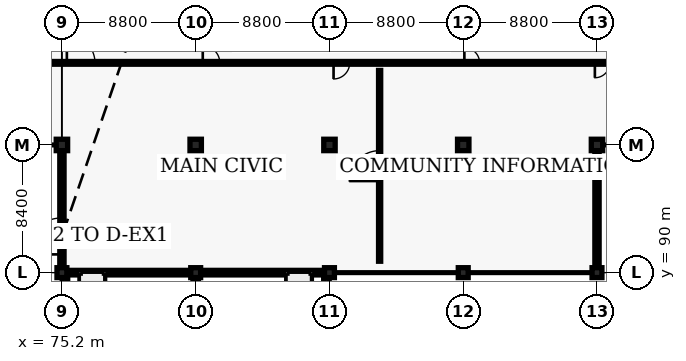
"""IFC4 building model, lengths in metres.
Left out: names, types, materials, properties, quantities, classifications, styles, units other than length and angle.
Written with IfcOpenShell. Run it as: python <this file> out.ifc"""

import sys

from ifc_helpers import new_model, si_unit, direction, frame, frame_2d, origin, origin_2d, place, context, subcontext, project, spatial, rectangle, extrude, element, fill, save


model = new_model("IFC4")
c1 = context("Model", 3, precision=1e-05, world=origin(), true_north=direction((0.0, 1.0)))
c2 = subcontext(c1, "Body", "Model", "MODEL_VIEW")
j1 = project(units=[si_unit("LENGTHUNIT", "METRE"), si_unit("PLANEANGLEUNIT", "RADIAN")], contexts=[c1])
p1 = place(None, origin())
s1 = spatial("IfcSite", under=j1, at=p1, CompositionType="ELEMENT")
p2 = place(p1, origin())
s2 = spatial("IfcBuilding", under=s1, at=p2, CompositionType="ELEMENT")
p3 = place(p2, origin())
s3 = spatial("IfcBuildingStorey", under=s2, at=p3, CompositionType="ELEMENT", Elevation=0.0)
p4 = place(p3, frame((75.2, 90.0, 0.0), z_axis=(0.0, 0.0, 1.0), x_axis=(1.0, 0.0, 0.0)))
e1 = element("IfcColumn", 1, at=p4, inside=s3, PredefinedType="COLUMN", context=c2, shape_type="SweptSolid", body=[
    extrude(rectangle(XDim=0.65, YDim=0.65, at=origin_2d()), origin(), (0.0, 0.0, 1.0), 4.8),
])
p5 = place(p3, frame((75.2, 98.4, 0.0), z_axis=(0.0, 0.0, 1.0), x_axis=(1.0, 0.0, 0.0)))
e2 = element("IfcColumn", 2, at=p5, inside=s3, PredefinedType="COLUMN", context=c2, shape_type="SweptSolid", body=[
    extrude(rectangle(XDim=0.75, YDim=0.75, at=origin_2d()), origin(), (0.0, 0.0, 1.0), 4.8),
])
p6 = place(p3, frame((84.0, 90.0, 0.0), z_axis=(0.0, 0.0, 1.0), x_axis=(1.0, 0.0, 0.0)))
e3 = element("IfcColumn", 3, at=p6, inside=s3, PredefinedType="COLUMN", context=c2, shape_type="SweptSolid", body=[
    extrude(rectangle(XDim=0.65, YDim=0.65, at=origin_2d()), origin(), (0.0, 0.0, 1.0), 4.8),
])
p7 = place(p3, frame((84.0, 98.4, 0.0), z_axis=(0.0, 0.0, 1.0), x_axis=(1.0, 0.0, 0.0)))
e4 = element("IfcColumn", 4, at=p7, inside=s3, PredefinedType="COLUMN", context=c2, shape_type="SweptSolid", body=[
    extrude(rectangle(XDim=0.75, YDim=0.75, at=origin_2d()), origin(), (0.0, 0.0, 1.0), 4.8),
])
p8 = place(p3, frame((92.8, 90.0, 0.0), z_axis=(0.0, 0.0, 1.0), x_axis=(1.0, 0.0, 0.0)))
e5 = element("IfcColumn", 5, at=p8, inside=s3, PredefinedType="COLUMN", context=c2, shape_type="SweptSolid", body=[
    extrude(rectangle(XDim=0.65, YDim=0.65, at=origin_2d()), origin(), (0.0, 0.0, 1.0), 4.8),
])
p9 = place(p3, frame((92.8, 98.4, 0.0), z_axis=(0.0, 0.0, 1.0), x_axis=(1.0, 0.0, 0.0)))
e6 = element("IfcColumn", 6, at=p9, inside=s3, PredefinedType="COLUMN", context=c2, shape_type="SweptSolid", body=[
    extrude(rectangle(XDim=0.75, YDim=0.75, at=origin_2d()), origin(), (0.0, 0.0, 1.0), 4.8),
])
p10 = place(p3, frame((101.6, 90.0, 0.0), z_axis=(0.0, 0.0, 1.0), x_axis=(1.0, 0.0, 0.0)))
e7 = element("IfcColumn", 7, at=p10, inside=s3, PredefinedType="COLUMN", context=c2, shape_type="SweptSolid", body=[
    extrude(rectangle(XDim=0.65, YDim=0.65, at=origin_2d()), origin(), (0.0, 0.0, 1.0), 4.8),
])
p11 = place(p3, frame((101.6, 98.4, 0.0), z_axis=(0.0, 0.0, 1.0), x_axis=(1.0, 0.0, 0.0)))
e8 = element("IfcColumn", 8, at=p11, inside=s3, PredefinedType="COLUMN", context=c2, shape_type="SweptSolid", body=[
    extrude(rectangle(XDim=0.75, YDim=0.75, at=origin_2d()), origin(), (0.0, 0.0, 1.0), 4.8),
])
p12 = place(p3, frame((110.4, 90.0, 0.0), z_axis=(0.0, 0.0, 1.0), x_axis=(1.0, 0.0, 0.0)))
e9 = element("IfcColumn", 9, at=p12, inside=s3, PredefinedType="COLUMN", context=c2, shape_type="SweptSolid", body=[
    extrude(rectangle(XDim=0.65, YDim=0.65, at=origin_2d()), origin(), (0.0, 0.0, 1.0), 4.8),
])
p13 = place(p3, frame((110.4, 98.4, 0.0), z_axis=(0.0, 0.0, 1.0), x_axis=(1.0, 0.0, 0.0)))
e10 = element("IfcColumn", 10, at=p13, inside=s3, PredefinedType="COLUMN", context=c2, shape_type="SweptSolid", body=[
    extrude(rectangle(XDim=0.75, YDim=0.75, at=origin_2d()), origin(), (0.0, 0.0, 1.0), 4.8),
])
for number, where, z_axis, x_axis in (
    (11, (75.3, 90.0, 0.0), (0.0, 0.0, 1.0), (1.0, 0.0, 0.0)),
    (12, (84.1, 90.0, 0.0), (0.0, 0.0, 1.0), (1.0, 0.0, 0.0)),
):
    element("IfcWall", number, at=place(p3, frame(where, z_axis=z_axis, x_axis=x_axis)), inside=s3, PredefinedType="SOLIDWALL", context=c2, shape_type="SweptSolid", body=[
        extrude(rectangle(XDim=8.6, YDim=0.3, at=frame_2d((4.3, 0.0))), origin(), (0.0, 0.0, 1.0), 3.675),
    ])
p14 = place(p3, frame((75.2, 90.15, 0.0), z_axis=(0.0, 0.0, 1.0), x_axis=(0.0, 1.0, 0.0)))
e13 = element("IfcWall", 13, at=p14, inside=s3, PredefinedType="SOLIDWALL", context=c2, shape_type="SweptSolid", body=[
    extrude(rectangle(XDim=8.1, YDim=0.28, at=frame_2d((4.05, 0.0))), origin(), (0.0, 0.0, 1.0), 3.775),
])
p15 = place(p14, frame((1.05, 0.0, 0.0)))
e14 = element("IfcOpeningElement", 14, at=p15, cuts=e13, PredefinedType="OPENING", context=c2, shape_type="SweptSolid", body=[
    extrude(rectangle(XDim=2.4, YDim=2.4, at=frame_2d((1.2, 1.2))), frame((0.0, 0.15, 0.0), z_axis=(0.0, -1.0, 0.0), x_axis=(1.0, 0.0, 0.0)), (0.0, 0.0, 1.0), 0.3),
])
p16 = place(p3, frame((110.4, 90.15, 0.0), z_axis=(0.0, 0.0, 1.0), x_axis=(0.0, 1.0, 0.0)))
e15 = element("IfcWall", 15, at=p16, inside=s3, PredefinedType="SOLIDWALL", context=c2, shape_type="SweptSolid", body=[
    extrude(rectangle(XDim=8.1, YDim=0.28, at=frame_2d((4.05, 0.0))), origin(), (0.0, 0.0, 1.0), 3.775),
])
for number, where, z_axis, x_axis in (
    (16, (75.4, 88.85, 0.0), (0.0, 0.0, 1.0), (0.0, 1.0, 0.0)),
    (17, (84.0, 88.85, 0.0), (0.0, 0.0, 1.0), (0.0, 1.0, 0.0)),
    (18, (92.6, 88.85, 0.0), (0.0, 0.0, 1.0), (0.0, 1.0, 0.0)),
):
    element("IfcWall", number, at=place(p3, frame(where, z_axis=z_axis, x_axis=x_axis)), inside=s3, PredefinedType="SOLIDWALL", context=c2, shape_type="SweptSolid", body=[
        extrude(rectangle(XDim=1.07, YDim=0.36, at=frame_2d((0.535, 0.0))), origin(), (0.0, 0.0, 1.0), 4.3),
    ])
p17 = place(p3, frame((42.15, 103.8, 0.0), z_axis=(0.0, 0.0, 1.0), x_axis=(1.0, 0.0, 0.0)))
e19 = element("IfcWall", 19, at=p17, inside=s3, PredefinedType="PARTITIONING", context=c2, shape_type="SweptSolid", body=[
    extrude(rectangle(XDim=102.9, YDim=0.18, at=frame_2d((51.45, 0.0))), origin(), (0.0, 0.0, 1.0), 3.775),
])
p18 = place(p17, frame((7.735, 0.0, 0.0)))
e20 = element("IfcOpeningElement", 20, at=p18, cuts=e19, PredefinedType="OPENING", context=c2, shape_type="SweptSolid", body=[
    extrude(rectangle(XDim=1.68, YDim=2.26, at=frame_2d((0.84, 1.13))), frame((0.0, 0.1, 0.0), z_axis=(0.0, -1.0, 0.0), x_axis=(1.0, 0.0, 0.0)), (0.0, 0.0, 1.0), 0.2),
])
p19 = place(p17, frame((16.63, 0.0, 0.0)))
e21 = element("IfcOpeningElement", 21, at=p19, cuts=e19, PredefinedType="OPENING", context=c2, shape_type="SweptSolid", body=[
    extrude(rectangle(XDim=1.04, YDim=2.08, at=frame_2d((0.52, 1.04))), frame((0.0, 0.1, 0.0), z_axis=(0.0, -1.0, 0.0), x_axis=(1.0, 0.0, 0.0)), (0.0, 0.0, 1.0), 0.2),
])
p20 = place(p17, frame((24.725, 0.0, 0.0)))
e22 = element("IfcOpeningElement", 22, at=p20, cuts=e19, PredefinedType="OPENING", context=c2, shape_type="SweptSolid", body=[
    extrude(rectangle(XDim=2.0, YDim=2.3, at=frame_2d((1.0, 1.15))), frame((0.0, 0.1, 0.0), z_axis=(0.0, -1.0, 0.0), x_axis=(1.0, 0.0, 0.0)), (0.0, 0.0, 1.0), 0.2),
])
p21 = place(p17, frame((33.375, 0.0, 0.0)))
e23 = element("IfcOpeningElement", 23, at=p21, cuts=e19, PredefinedType="OPENING", context=c2, shape_type="SweptSolid", body=[
    extrude(rectangle(XDim=1.85, YDim=2.22, at=frame_2d((0.925, 1.11))), frame((0.0, 0.1, 0.0), z_axis=(0.0, -1.0, 0.0), x_axis=(1.0, 0.0, 0.0)), (0.0, 0.0, 1.0), 0.2),
])
p22 = place(p17, frame((42.315, 0.0, 0.0)))
e24 = element("IfcOpeningElement", 24, at=p22, cuts=e19, PredefinedType="OPENING", context=c2, shape_type="SweptSolid", body=[
    extrude(rectangle(XDim=1.12, YDim=2.16, at=frame_2d((0.56, 1.08))), frame((0.0, 0.1, 0.0), z_axis=(0.0, -1.0, 0.0), x_axis=(1.0, 0.0, 0.0)), (0.0, 0.0, 1.0), 0.2),
])
p23 = place(p17, frame((50.92, 0.0, 0.0)))
e25 = element("IfcOpeningElement", 25, at=p23, cuts=e19, PredefinedType="OPENING", context=c2, shape_type="SweptSolid", body=[
    extrude(rectangle(XDim=1.06, YDim=2.16, at=frame_2d((0.53, 1.08))), frame((0.0, 0.1, 0.0), z_axis=(0.0, -1.0, 0.0), x_axis=(1.0, 0.0, 0.0)), (0.0, 0.0, 1.0), 0.2),
])
p24 = place(p17, frame((59.525, 0.0, 0.0)))
e26 = element("IfcOpeningElement", 26, at=p24, cuts=e19, PredefinedType="OPENING", context=c2, shape_type="SweptSolid", body=[
    extrude(rectangle(XDim=1.0, YDim=2.14, at=frame_2d((0.5, 1.07))), frame((0.0, 0.1, 0.0), z_axis=(0.0, -1.0, 0.0), x_axis=(1.0, 0.0, 0.0)), (0.0, 0.0, 1.0), 0.2),
])
p25 = place(p17, frame((68.11, 0.0, 0.0)))
e27 = element("IfcOpeningElement", 27, at=p25, cuts=e19, PredefinedType="OPENING", context=c2, shape_type="SweptSolid", body=[
    extrude(rectangle(XDim=0.98, YDim=2.12, at=frame_2d((0.49, 1.06))), frame((0.0, 0.1, 0.0), z_axis=(0.0, -1.0, 0.0), x_axis=(1.0, 0.0, 0.0)), (0.0, 0.0, 1.0), 0.2),
])
p26 = place(p17, frame((76.7, 0.0, 0.0)))
e28 = element("IfcOpeningElement", 28, at=p26, cuts=e19, PredefinedType="OPENING", context=c2, shape_type="SweptSolid", body=[
    extrude(rectangle(XDim=0.95, YDim=2.12, at=frame_2d((0.475, 1.06))), frame((0.0, 0.1, 0.0), z_axis=(0.0, -1.0, 0.0), x_axis=(1.0, 0.0, 0.0)), (0.0, 0.0, 1.0), 0.2),
])
p27 = place(p17, frame((85.29, 0.0, 0.0)))
e29 = element("IfcOpeningElement", 29, at=p27, cuts=e19, PredefinedType="OPENING", context=c2, shape_type="SweptSolid", body=[
    extrude(rectangle(XDim=0.92, YDim=2.1, at=frame_2d((0.46, 1.05))), frame((0.0, 0.1, 0.0), z_axis=(0.0, -1.0, 0.0), x_axis=(1.0, 0.0, 0.0)), (0.0, 0.0, 1.0), 0.2),
])
p28 = place(p17, frame((93.845, 0.0, 0.0)))
e30 = element("IfcOpeningElement", 30, at=p28, cuts=e19, PredefinedType="OPENING", context=c2, shape_type="SweptSolid", body=[
    extrude(rectangle(XDim=0.96, YDim=2.08, at=frame_2d((0.48, 1.04))), frame((0.0, 0.1, 0.0), z_axis=(0.0, -1.0, 0.0), x_axis=(1.0, 0.0, 0.0)), (0.0, 0.0, 1.0), 0.2),
])
p29 = place(p3, frame((96.1, 90.75, 0.0), z_axis=(0.0, 0.0, 1.0), x_axis=(0.0, 1.0, 0.0)))
e31 = element("IfcWall", 31, at=p29, inside=s3, PredefinedType="PARTITIONING", context=c2, shape_type="SweptSolid", body=[
    extrude(rectangle(XDim=12.55, YDim=0.14, at=frame_2d((6.275, 0.0))), origin(), (0.0, 0.0, 1.0), 3.675),
])
p30 = place(p29, frame((5.275, 0.0, 0.0)))
e32 = element("IfcOpeningElement", 32, at=p30, cuts=e31, PredefinedType="OPENING", context=c2, shape_type="SweptSolid", body=[
    extrude(rectangle(XDim=2.0, YDim=2.3, at=frame_2d((1.0, 1.15))), frame((0.0, 0.08, 0.0), z_axis=(0.0, -1.0, 0.0), x_axis=(1.0, 0.0, 0.0)), (0.0, 0.0, 1.0), 0.16),
])
p31 = place(p15, origin())
e33 = element("IfcDoor", 33, at=p31, inside=s3, OperationType="DOUBLE_DOOR_SINGLE_SWING", PredefinedType="DOOR", context=c2, shape_type="SweptSolid", body=[
    extrude(rectangle(XDim=2.4, YDim=2.4, at=frame_2d((1.2, 1.2))), frame((0.0, 0.025, 0.0), z_axis=(0.0, -1.0, 0.0), x_axis=(1.0, 0.0, 0.0)), (0.0, 0.0, 1.0), 0.05),
])
fill(e14, e33)
p32 = place(p21, origin())
e34 = element("IfcDoor", 34, at=p32, inside=s3, OperationType="DOUBLE_DOOR_SINGLE_SWING", PredefinedType="DOOR", context=c2, shape_type="SweptSolid", body=[
    extrude(rectangle(XDim=1.85, YDim=2.22, at=frame_2d((0.925, 1.11))), frame((0.0, 0.025, 0.0), z_axis=(0.0, -1.0, 0.0), x_axis=(1.0, 0.0, 0.0)), (0.0, 0.0, 1.0), 0.05),
])
fill(e23, e34)
p33 = place(p22, origin())
e35 = element("IfcDoor", 35, at=p33, inside=s3, OperationType="SINGLE_SWING_LEFT", PredefinedType="DOOR", context=c2, shape_type="SweptSolid", body=[
    extrude(rectangle(XDim=1.12, YDim=2.16, at=frame_2d((0.56, 1.08))), frame((0.0, 0.025, 0.0), z_axis=(0.0, -1.0, 0.0), x_axis=(1.0, 0.0, 0.0)), (0.0, 0.0, 1.0), 0.05),
])
fill(e24, e35)
p34 = place(p23, origin())
e36 = element("IfcDoor", 36, at=p34, inside=s3, OperationType="SINGLE_SWING_RIGHT", PredefinedType="DOOR", context=c2, shape_type="SweptSolid", body=[
    extrude(rectangle(XDim=1.06, YDim=2.16, at=frame_2d((0.53, 1.08))), frame((0.0, 0.025, 0.0), z_axis=(0.0, -1.0, 0.0), x_axis=(1.0, 0.0, 0.0)), (0.0, 0.0, 1.0), 0.05),
])
fill(e25, e36)
p35 = place(p24, origin())
e37 = element("IfcDoor", 37, at=p35, inside=s3, OperationType="SINGLE_SWING_LEFT", PredefinedType="DOOR", context=c2, shape_type="SweptSolid", body=[
    extrude(rectangle(XDim=1.0, YDim=2.14, at=frame_2d((0.5, 1.07))), frame((0.0, 0.025, 0.0), z_axis=(0.0, -1.0, 0.0), x_axis=(1.0, 0.0, 0.0)), (0.0, 0.0, 1.0), 0.05),
])
fill(e26, e37)
p36 = place(p25, origin())
e38 = element("IfcDoor", 38, at=p36, inside=s3, OperationType="SINGLE_SWING_RIGHT", PredefinedType="DOOR", context=c2, shape_type="SweptSolid", body=[
    extrude(rectangle(XDim=0.98, YDim=2.12, at=frame_2d((0.49, 1.06))), frame((0.0, 0.025, 0.0), z_axis=(0.0, -1.0, 0.0), x_axis=(1.0, 0.0, 0.0)), (0.0, 0.0, 1.0), 0.05),
])
fill(e27, e38)
p37 = place(p30, origin())
e39 = element("IfcDoor", 39, at=p37, inside=s3, OperationType="DOUBLE_DOOR_SINGLE_SWING", PredefinedType="DOOR", context=c2, shape_type="SweptSolid", body=[
    extrude(rectangle(XDim=2.0, YDim=2.3, at=frame_2d((1.0, 1.15))), frame((0.0, 0.025, 0.0), z_axis=(0.0, -1.0, 0.0), x_axis=(1.0, 0.0, 0.0)), (0.0, 0.0, 1.0), 0.05),
])
fill(e32, e39)
save(model, sys.argv[1])
